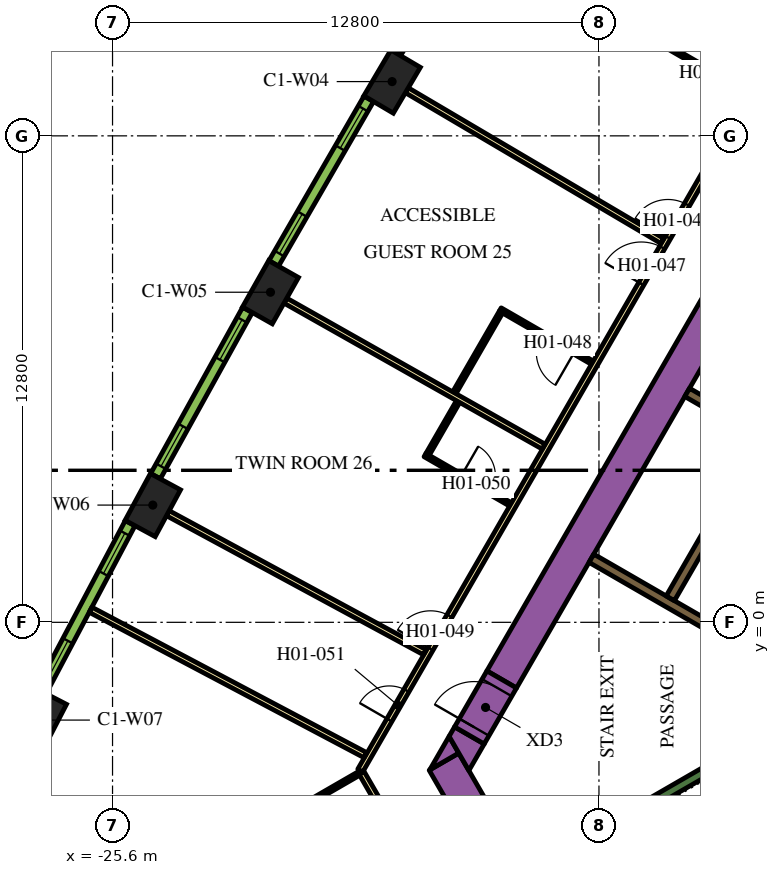
"""IFC4 building model, lengths in metres.
Left out: names, types, materials, properties, quantities, classifications, styles, units other than length and angle.
Written with IfcOpenShell. Run it as: python <this file> out.ifc"""

import sys

from ifc_helpers import new_model, si_unit, direction, frame, frame_2d, origin, origin_2d, place, context, subcontext, project, spatial, polyline, rectangle, outline, extrude, element, fill, save


model = new_model("IFC4")
c1 = context("Model", 3, precision=1e-05, world=origin(), true_north=direction((0.0, 1.0)))
c2 = subcontext(c1, "Body", "Model", "MODEL_VIEW")
j1 = project(units=[si_unit("LENGTHUNIT", "METRE"), si_unit("PLANEANGLEUNIT", "RADIAN")], contexts=[c1])
p1 = place(None, origin())
s1 = spatial("IfcSite", under=j1, at=p1, CompositionType="ELEMENT")
p2 = place(p1, origin())
s2 = spatial("IfcBuilding", under=s1, at=p2, CompositionType="ELEMENT")
p3 = place(p2, frame((0.0, 0.0, 31.5)))
s3 = spatial("IfcBuildingStorey", under=s2, at=p3, CompositionType="ELEMENT", Elevation=31.5)
for number, where, z_axis, x_axis in (
    (1, (-18.243, 14.228, 0.0), (0.0, 0.0, 1.0), (-0.508, -0.861, 0.0)),
    (2, (-21.443, 8.685, 0.0), (0.0, 0.0, 1.0), (-0.492, -0.871, 0.0)),
    (3, (-24.54, 3.085, 0.0), (0.0, 0.0, 1.0), (-0.476, -0.88, 0.0)),
    (4, (-27.533, -2.572, 0.0), (0.0, 0.0, 1.0), (-0.459, -0.888, 0.0)),
):
    element("IfcColumn", number, at=place(p3, frame(where, z_axis=z_axis, x_axis=x_axis)), inside=s3, PredefinedType="COLUMN", context=c2, shape_type="SweptSolid", body=[
        extrude(rectangle(XDim=1.4, YDim=0.9, at=origin_2d()), origin(), (0.0, 0.0, 1.0), 3.9),
    ])
p4 = place(p3, frame((-15.36, -1.503, 0.0), z_axis=(0.0, 0.0, 1.0), x_axis=(0.50000389221, 0.866023156604, 0.0)))
e5 = element("IfcWall", 5, at=p4, inside=s3, PredefinedType="SOLIDWALL", context=c2, shape_type="SweptSolid", body=[
    extrude(rectangle(XDim=21.0, YDim=0.9, at=frame_2d((10.5, 0.0))), origin(), (0.0, 0.0, 1.0), 3.9),
])
p5 = place(p3, frame((-12.134, -11.883, 0.0), z_axis=(0.0, 0.0, 1.0), x_axis=(-0.500005339912, 0.866022320763, 0.0)))
e6 = element("IfcWall", 6, at=p5, inside=s3, PredefinedType="SOLIDWALL", context=c2, shape_type="SweptSolid", body=[
    extrude(rectangle(XDim=9.488, YDim=0.9, at=frame_2d((4.744, 0.0))), origin(), (0.0, 0.0, 1.0), 3.9),
])
p6 = place(p3, origin())
e7 = element("IfcWall", 7, at=p6, inside=s3, PredefinedType="SOLIDWALL", context=c2, shape_type="SweptSolid", body=[
    extrude(outline(polyline([(-16.489, -3.44), (-17.251, -3.88), (-16.743, -3.0), (-16.489, -3.44)])), origin(), (0.0, 0.0, 1.0), 3.9),
])
e8 = element("IfcWall", 8, at=p6, inside=s3, PredefinedType="SOLIDWALL", context=c2, shape_type="SweptSolid", body=[
    extrude(outline(polyline([(-15.82, -3.201), (-16.223, -3.9), (-16.743, -3.0), (-16.599, -2.751), (-15.82, -3.201)])), origin(), (0.0, 0.0, 1.0), 3.9),
])
p7 = place(p3, frame((-14.44, -6.49, 0.0), z_axis=(0.0, 0.0, 1.0), x_axis=(0.866022966069, 0.500004222222, 0.0)))
e9 = element("IfcWall", 9, at=p7, inside=s3, PredefinedType="SOLIDWALL", context=c2, shape_type="SweptSolid", body=[
    extrude(rectangle(XDim=6.8, YDim=0.25, at=frame_2d((3.4, 0.0))), origin(), (0.0, 0.0, 1.0), 3.9),
])
p8 = place(p3, frame((-8.106, -1.14, 0.0), z_axis=(0.0, 0.0, 1.0), x_axis=(-0.866000643155, 0.500042884217, 0.0)))
e10 = element("IfcWall", 10, at=p8, inside=s3, PredefinedType="SOLIDWALL", context=c2, shape_type="SweptSolid", body=[
    extrude(rectangle(XDim=5.65, YDim=0.25, at=frame_2d((2.825, 0.0))), origin(), (0.0, 0.0, 1.0), 3.9),
])
p9 = place(p3, frame((-8.574, 4.95, 0.0), z_axis=(0.0, 0.0, 1.0), x_axis=(-0.866008176907, 0.50002983664, 0.0)))
e11 = element("IfcWall", 11, at=p9, inside=s3, PredefinedType="SOLIDWALL", context=c2, shape_type="SweptSolid", body=[
    extrude(rectangle(XDim=2.2, YDim=0.25, at=frame_2d((1.1, 0.0))), origin(), (0.0, 0.0, 1.0), 3.9),
])
p10 = place(p3, frame((-6.008, 9.144, 0.0), z_axis=(0.0, 0.0, 1.0), x_axis=(-0.500006956611, -0.866021387346, 0.0)))
e12 = element("IfcWall", 12, at=p10, inside=s3, PredefinedType="SOLIDWALL", context=c2, shape_type="SweptSolid", body=[
    extrude(rectangle(XDim=9.83, YDim=0.25, at=frame_2d((4.915, 0.0))), origin(), (0.0, 0.0, 1.0), 3.9),
])
p11 = place(p10, frame((6.985, 0.0, 0.0)))
e13 = element("IfcOpeningElement", 13, at=p11, cuts=e12, PredefinedType="OPENING", context=c2, shape_type="SweptSolid", body=[
    extrude(rectangle(XDim=0.9, YDim=2.1, at=frame_2d((0.45, 1.05))), frame((0.0, 0.135, 0.0), z_axis=(0.0, -1.0, 0.0), x_axis=(1.0, 0.0, 0.0)), (0.0, 0.0, 1.0), 0.27),
])
p12 = place(p3, frame((-16.209, -2.976, 0.0), z_axis=(0.0, 0.0, 1.0), x_axis=(0.499954529098, 0.86605165483, 0.0)))
e14 = element("IfcWall", 14, at=p12, inside=s3, PredefinedType="SOLIDWALL", context=c2, shape_type="SweptSolid", body=[
    extrude(rectangle(XDim=1.7, YDim=0.9, at=frame_2d((0.85, 0.0))), origin(), (0.0, 0.0, 1.0), 3.9),
])
p13 = place(p12, frame((0.25, 0.0, 0.0)))
e15 = element("IfcOpeningElement", 15, at=p13, cuts=e14, PredefinedType="OPENING", context=c2, shape_type="SweptSolid", body=[
    extrude(rectangle(XDim=1.2, YDim=2.1, at=frame_2d((0.6, 1.05))), frame((0.0, 0.46, 0.0), z_axis=(0.0, -1.0, 0.0), x_axis=(1.0, 0.0, 0.0)), (0.0, 0.0, 1.0), 0.92),
])
p14 = place(p3, frame((-19.081, -3.9, 0.0), z_axis=(0.0, 0.0, 1.0), x_axis=(0.499998313975, 0.866026377209, 0.0)))
e16 = element("IfcWall", 16, at=p14, inside=s3, PredefinedType="PARTITIONING", context=c2, shape_type="SweptSolid", body=[
    extrude(rectangle(XDim=25.766, YDim=0.15, at=frame_2d((12.883, 0.0))), origin(), (0.0, 0.0, 1.0), 2.75),
])
p15 = place(p14, frame((24.586, 0.0, 0.0)))
e17 = element("IfcOpeningElement", 17, at=p15, cuts=e16, PredefinedType="OPENING", context=c2, shape_type="SweptSolid", body=[
    extrude(rectangle(XDim=1.0, YDim=2.1, at=frame_2d((0.5, 1.05))), frame((0.0, 0.085, 0.0), z_axis=(0.0, -1.0, 0.0), x_axis=(1.0, 0.0, 0.0)), (0.0, 0.0, 1.0), 0.17),
])
p16 = place(p14, frame((16.196, 0.0, 0.0)))
e18 = element("IfcOpeningElement", 18, at=p16, cuts=e16, PredefinedType="OPENING", context=c2, shape_type="SweptSolid", body=[
    extrude(rectangle(XDim=1.0, YDim=2.1, at=frame_2d((0.5, 1.05))), frame((0.0, 0.085, 0.0), z_axis=(0.0, -1.0, 0.0), x_axis=(1.0, 0.0, 0.0)), (0.0, 0.0, 1.0), 0.17),
])
p17 = place(p14, frame((14.789, 0.0, 0.0)))
e19 = element("IfcOpeningElement", 19, at=p17, cuts=e16, PredefinedType="OPENING", context=c2, shape_type="SweptSolid", body=[
    extrude(rectangle(XDim=1.1, YDim=2.1, at=frame_2d((0.55, 1.05))), frame((0.0, 0.085, 0.0), z_axis=(0.0, -1.0, 0.0), x_axis=(1.0, 0.0, 0.0)), (0.0, 0.0, 1.0), 0.17),
])
p18 = place(p14, frame((3.698, 0.0, 0.0)))
e20 = element("IfcOpeningElement", 20, at=p18, cuts=e16, PredefinedType="OPENING", context=c2, shape_type="SweptSolid", body=[
    extrude(rectangle(XDim=1.0, YDim=2.1, at=frame_2d((0.5, 1.05))), frame((0.0, 0.085, 0.0), z_axis=(0.0, -1.0, 0.0), x_axis=(1.0, 0.0, 0.0)), (0.0, 0.0, 1.0), 0.17),
])
p19 = place(p14, frame((1.531, 0.0, 0.0)))
e21 = element("IfcOpeningElement", 21, at=p19, cuts=e16, PredefinedType="OPENING", context=c2, shape_type="SweptSolid", body=[
    extrude(rectangle(XDim=0.9, YDim=2.1, at=frame_2d((0.45, 1.05))), frame((0.0, 0.085, 0.0), z_axis=(0.0, -1.0, 0.0), x_axis=(1.0, 0.0, 0.0)), (0.0, 0.0, 1.0), 0.17),
])
p20 = place(p3, frame((-16.412, -8.523, 0.0), z_axis=(0.0, 0.0, 1.0), x_axis=(-0.500001929737, 0.866024289647, 0.0)))
e22 = element("IfcWall", 22, at=p20, inside=s3, PredefinedType="PARTITIONING", context=c2, shape_type="SweptSolid", body=[
    extrude(rectangle(XDim=5.268, YDim=0.15, at=frame_2d((2.634, 0.0))), origin(), (0.0, 0.0, 1.0), 2.75),
])
p21 = place(p20, frame((0.226, 0.0, 0.0)))
e23 = element("IfcOpeningElement", 23, at=p21, cuts=e22, PredefinedType="OPENING", context=c2, shape_type="SweptSolid", body=[
    extrude(rectangle(XDim=1.0, YDim=2.1, at=frame_2d((0.5, 1.05))), frame((0.0, 0.085, 0.0), z_axis=(0.0, -1.0, 0.0), x_axis=(1.0, 0.0, 0.0)), (0.0, 0.0, 1.0), 0.17),
])
p22 = place(p3, frame((-26.178, 0.331, 0.0), z_axis=(0.0, 0.0, 1.0), x_axis=(0.883908370409, -0.467660125221, 0.0)))
e24 = element("IfcWall", 24, at=p22, inside=s3, PredefinedType="PARTITIONING", context=c2, shape_type="SweptSolid", body=[
    extrude(rectangle(XDim=8.182, YDim=0.15, at=frame_2d((4.091, 0.0))), origin(), (0.0, 0.0, 1.0), 2.75),
])
p23 = place(p3, frame((-24.145, 2.871, 0.0), z_axis=(0.0, 0.0, 1.0), x_axis=(0.879551725039, -0.475803281809, 0.0)))
e25 = element("IfcWall", 25, at=p23, inside=s3, PredefinedType="PARTITIONING", context=c2, shape_type="SweptSolid", body=[
    extrude(rectangle(XDim=7.688, YDim=0.15, at=frame_2d((3.844, 0.0))), origin(), (0.0, 0.0, 1.0), 2.75),
])
p24 = place(p3, frame((-21.052, 8.464, 0.0), z_axis=(0.0, 0.0, 1.0), x_axis=(0.87059371954, -0.492002617368, 0.0)))
e26 = element("IfcWall", 26, at=p24, inside=s3, PredefinedType="PARTITIONING", context=c2, shape_type="SweptSolid", body=[
    extrude(rectangle(XDim=7.803, YDim=0.15, at=frame_2d((3.902, 0.0))), origin(), (0.0, 0.0, 1.0), 2.75),
])
p25 = place(p3, frame((-17.856, 13.999, 0.0), z_axis=(0.0, 0.0, 1.0), x_axis=(0.861371519381, -0.507975497047, 0.0)))
e27 = element("IfcWall", 27, at=p25, inside=s3, PredefinedType="PARTITIONING", context=c2, shape_type="SweptSolid", body=[
    extrude(rectangle(XDim=7.804, YDim=0.15, at=frame_2d((3.902, 0.0))), origin(), (0.0, 0.0, 1.0), 2.75),
])
p26 = place(p3, frame((-11.129, 15.224, 0.0), z_axis=(0.0, 0.0, 1.0), x_axis=(0.866021400173, -0.500006934395, 0.0)))
e28 = element("IfcWall", 28, at=p26, inside=s3, PredefinedType="PARTITIONING", context=c2, shape_type="SweptSolid", body=[
    extrude(rectangle(XDim=2.6, YDim=0.1, at=frame_2d((1.3, 0.0))), origin(), (0.0, 0.0, 1.0), 2.75),
])
p27 = place(p26, frame((1.1, 0.0, 0.0)))
e29 = element("IfcOpeningElement", 29, at=p27, cuts=e28, PredefinedType="OPENING", context=c2, shape_type="SweptSolid", body=[
    extrude(rectangle(XDim=0.9, YDim=2.1, at=frame_2d((0.45, 1.05))), frame((0.0, 0.06, 0.0), z_axis=(0.0, -1.0, 0.0), x_axis=(1.0, 0.0, 0.0)), (0.0, 0.0, 1.0), 0.12),
])
p28 = place(p3, frame((-12.972, 6.831, 0.0), z_axis=(0.0, 0.0, 1.0), x_axis=(-0.866018616679, 0.500011755427, 0.0)))
e30 = element("IfcWall", 30, at=p28, inside=s3, PredefinedType="PARTITIONING", context=c2, shape_type="SweptSolid", body=[
    extrude(rectangle(XDim=2.8, YDim=0.1, at=frame_2d((1.4, 0.0))), origin(), (0.0, 0.0, 1.0), 2.75),
])
p29 = place(p28, frame((0.55, 0.0, 0.0)))
e31 = element("IfcOpeningElement", 31, at=p29, cuts=e30, PredefinedType="OPENING", context=c2, shape_type="SweptSolid", body=[
    extrude(rectangle(XDim=1.0, YDim=2.1, at=frame_2d((0.5, 1.05))), frame((0.0, 0.06, 0.0), z_axis=(0.0, -1.0, 0.0), x_axis=(1.0, 0.0, 0.0)), (0.0, 0.0, 1.0), 0.12),
])
p30 = place(p3, frame((-15.379, 8.163, 0.0), z_axis=(0.0, 0.0, 1.0), x_axis=(-0.499987006516, -0.866032905446, 0.0)))
e32 = element("IfcWall", 32, at=p30, inside=s3, PredefinedType="PARTITIONING", context=c2, shape_type="SweptSolid", body=[
    extrude(rectangle(XDim=2.45, YDim=0.1, at=frame_2d((1.225, 0.0))), origin(), (0.0, 0.0, 1.0), 2.75),
])
p31 = place(p3, frame((-17.378, 4.401, 0.0), z_axis=(0.0, 0.0, 1.0), x_axis=(0.865997922154, -0.500047596559, 0.0)))
e33 = element("IfcWall", 33, at=p31, inside=s3, PredefinedType="PARTITIONING", context=c2, shape_type="SweptSolid", body=[
    extrude(rectangle(XDim=2.6, YDim=0.1, at=frame_2d((1.3, 0.0))), origin(), (0.0, 0.0, 1.0), 2.75),
])
p32 = place(p31, frame((1.1, 0.0, 0.0)))
e34 = element("IfcOpeningElement", 34, at=p32, cuts=e33, PredefinedType="OPENING", context=c2, shape_type="SweptSolid", body=[
    extrude(rectangle(XDim=0.9, YDim=2.1, at=frame_2d((0.45, 1.05))), frame((0.0, 0.06, 0.0), z_axis=(0.0, -1.0, 0.0), x_axis=(1.0, 0.0, 0.0)), (0.0, 0.0, 1.0), 0.12),
])
p33 = place(p3, frame((-17.309, 4.419, 0.0), z_axis=(0.0, 0.0, 1.0), x_axis=(0.499880961361, 0.866094119867, 0.0)))
e35 = element("IfcWall", 35, at=p33, inside=s3, PredefinedType="PARTITIONING", context=c2, shape_type="SweptSolid", body=[
    extrude(rectangle(XDim=1.6, YDim=0.1, at=frame_2d((0.8, 0.0))), origin(), (0.0, 0.0, 1.0), 2.75),
])
p34 = place(p3, frame((-19.121, -3.981, 0.0), z_axis=(0.0, 0.0, 1.0), x_axis=(-0.866021400173, -0.500006934395, 0.0)))
e36 = element("IfcWall", 36, at=p34, inside=s3, PredefinedType="PARTITIONING", context=c2, shape_type="SweptSolid", body=[
    extrude(rectangle(XDim=2.6, YDim=0.1, at=frame_2d((1.3, 0.0))), origin(), (0.0, 0.0, 1.0), 2.75),
])
p35 = place(p3, frame((-15.564, 19.267, 0.0), z_axis=(0.0, 0.0, 1.0), x_axis=(-0.515938796285, -0.856625448191, 0.0)))
e37 = element("IfcWall", 37, at=p35, inside=s3, PredefinedType="SOLIDWALL", context=c2, shape_type="SweptSolid", body=[
    extrude(rectangle(XDim=4.998, YDim=0.29, at=frame_2d((2.499, 0.0))), origin(), (0.0, 0.0, 1.0), 3.65),
])
p36 = place(p35, frame((0.297, 0.0, 0.9)))
e38 = element("IfcOpeningElement", 38, at=p36, cuts=e37, PredefinedType="OPENING", context=c2, shape_type="SweptSolid", body=[
    extrude(rectangle(XDim=1.2, YDim=2.15, at=frame_2d((0.6, 1.075))), frame((0.0, 0.155, 0.0), z_axis=(0.0, -1.0, 0.0), x_axis=(1.0, 0.0, 0.0)), (0.0, 0.0, 1.0), 0.31),
])
p37 = place(p35, frame((3.501, 0.0, 0.9)))
e39 = element("IfcOpeningElement", 39, at=p37, cuts=e37, PredefinedType="OPENING", context=c2, shape_type="SweptSolid", body=[
    extrude(rectangle(XDim=1.2, YDim=2.15, at=frame_2d((0.6, 1.075))), frame((0.0, 0.155, 0.0), z_axis=(0.0, -1.0, 0.0), x_axis=(1.0, 0.0, 0.0)), (0.0, 0.0, 1.0), 0.31),
])
p38 = place(p3, frame((-18.858, 13.773, 0.0), z_axis=(0.0, 0.0, 1.0), x_axis=(-0.50002123722, -0.866013142123, 0.0)))
e40 = element("IfcWall", 40, at=p38, inside=s3, PredefinedType="SOLIDWALL", context=c2, shape_type="SweptSolid", body=[
    extrude(rectangle(XDim=4.998, YDim=0.29, at=frame_2d((2.499, 0.0))), origin(), (0.0, 0.0, 1.0), 3.65),
])
p39 = place(p38, frame((0.297, 0.0, 0.9)))
e41 = element("IfcOpeningElement", 41, at=p39, cuts=e40, PredefinedType="OPENING", context=c2, shape_type="SweptSolid", body=[
    extrude(rectangle(XDim=1.2, YDim=2.15, at=frame_2d((0.6, 1.075))), frame((0.0, 0.155, 0.0), z_axis=(0.0, -1.0, 0.0), x_axis=(1.0, 0.0, 0.0)), (0.0, 0.0, 1.0), 0.31),
])
p40 = place(p38, frame((3.501, 0.0, 0.9)))
e42 = element("IfcOpeningElement", 42, at=p40, cuts=e40, PredefinedType="OPENING", context=c2, shape_type="SweptSolid", body=[
    extrude(rectangle(XDim=1.2, YDim=2.15, at=frame_2d((0.6, 1.075))), frame((0.0, 0.155, 0.0), z_axis=(0.0, -1.0, 0.0), x_axis=(1.0, 0.0, 0.0)), (0.0, 0.0, 1.0), 0.31),
])
p41 = place(p3, frame((-22.05, 8.22, 0.0), z_axis=(0.0, 0.0, 1.0), x_axis=(-0.483912572871, -0.875116347589, 0.0)))
e43 = element("IfcWall", 43, at=p41, inside=s3, PredefinedType="SOLIDWALL", context=c2, shape_type="SweptSolid", body=[
    extrude(rectangle(XDim=4.998, YDim=0.29, at=frame_2d((2.499, 0.0))), origin(), (0.0, 0.0, 1.0), 3.65),
])
p42 = place(p41, frame((0.297, 0.0, 0.9)))
e44 = element("IfcOpeningElement", 44, at=p42, cuts=e43, PredefinedType="OPENING", context=c2, shape_type="SweptSolid", body=[
    extrude(rectangle(XDim=1.2, YDim=2.15, at=frame_2d((0.6, 1.075))), frame((0.0, 0.155, 0.0), z_axis=(0.0, -1.0, 0.0), x_axis=(1.0, 0.0, 0.0)), (0.0, 0.0, 1.0), 0.31),
])
p43 = place(p41, frame((3.501, 0.0, 0.9)))
e45 = element("IfcOpeningElement", 45, at=p43, cuts=e43, PredefinedType="OPENING", context=c2, shape_type="SweptSolid", body=[
    extrude(rectangle(XDim=1.2, YDim=2.15, at=frame_2d((0.6, 1.075))), frame((0.0, 0.155, 0.0), z_axis=(0.0, -1.0, 0.0), x_axis=(1.0, 0.0, 0.0)), (0.0, 0.0, 1.0), 0.31),
])
p44 = place(p3, frame((-25.138, 2.608, 0.0), z_axis=(0.0, 0.0, 1.0), x_axis=(-0.467629620899, -0.883924509026, 0.0)))
e46 = element("IfcWall", 46, at=p44, inside=s3, PredefinedType="SOLIDWALL", context=c2, shape_type="SweptSolid", body=[
    extrude(rectangle(XDim=4.998, YDim=0.29, at=frame_2d((2.499, 0.0))), origin(), (0.0, 0.0, 1.0), 3.65),
])
p45 = place(p44, frame((0.297, 0.0, 0.9)))
e47 = element("IfcOpeningElement", 47, at=p45, cuts=e46, PredefinedType="OPENING", context=c2, shape_type="SweptSolid", body=[
    extrude(rectangle(XDim=1.2, YDim=2.15, at=frame_2d((0.6, 1.075))), frame((0.0, 0.155, 0.0), z_axis=(0.0, -1.0, 0.0), x_axis=(1.0, 0.0, 0.0)), (0.0, 0.0, 1.0), 0.31),
])
p46 = place(p44, frame((3.501, 0.0, 0.9)))
e48 = element("IfcOpeningElement", 48, at=p46, cuts=e46, PredefinedType="OPENING", context=c2, shape_type="SweptSolid", body=[
    extrude(rectangle(XDim=1.2, YDim=2.15, at=frame_2d((0.6, 1.075))), frame((0.0, 0.155, 0.0), z_axis=(0.0, -1.0, 0.0), x_axis=(1.0, 0.0, 0.0)), (0.0, 0.0, 1.0), 0.31),
])
p47 = place(p13, origin())
e49 = element("IfcDoor", 49, at=p47, inside=s3, OperationType="SINGLE_SWING_LEFT", PredefinedType="DOOR", context=c2, shape_type="SweptSolid", body=[
    extrude(rectangle(XDim=1.2, YDim=2.1, at=frame_2d((0.6, 1.05))), frame((0.0, 0.025, 0.0), z_axis=(0.0, -1.0, 0.0), x_axis=(1.0, 0.0, 0.0)), (0.0, 0.0, 1.0), 0.05),
])
fill(e15, e49)
p48 = place(p16, origin())
e50 = element("IfcDoor", 50, at=p48, inside=s3, OperationType="SINGLE_SWING_LEFT", PredefinedType="DOOR", context=c2, shape_type="SweptSolid", body=[
    extrude(rectangle(XDim=1.0, YDim=2.1, at=frame_2d((0.5, 1.05))), frame((0.0, 0.025, 0.0), z_axis=(0.0, -1.0, 0.0), x_axis=(1.0, 0.0, 0.0)), (0.0, 0.0, 1.0), 0.05),
])
fill(e18, e50)
p49 = place(p27, origin())
e51 = element("IfcDoor", 51, at=p49, inside=s3, OperationType="SINGLE_SWING_RIGHT", PredefinedType="DOOR", context=c2, shape_type="SweptSolid", body=[
    extrude(rectangle(XDim=0.9, YDim=2.1, at=frame_2d((0.45, 1.05))), frame((0.0, 0.025, 0.0), z_axis=(0.0, -1.0, 0.0), x_axis=(1.0, 0.0, 0.0)), (0.0, 0.0, 1.0), 0.05),
])
fill(e29, e51)
p50 = place(p17, origin())
e52 = element("IfcDoor", 52, at=p50, inside=s3, OperationType="SINGLE_SWING_RIGHT", PredefinedType="DOOR", context=c2, shape_type="SweptSolid", body=[
    extrude(rectangle(XDim=1.1, YDim=2.1, at=frame_2d((0.55, 1.05))), frame((0.0, 0.025, 0.0), z_axis=(0.0, -1.0, 0.0), x_axis=(1.0, 0.0, 0.0)), (0.0, 0.0, 1.0), 0.05),
])
fill(e19, e52)
p51 = place(p29, origin())
e53 = element("IfcDoor", 53, at=p51, inside=s3, OperationType="SINGLE_SWING_LEFT", PredefinedType="DOOR", context=c2, shape_type="SweptSolid", body=[
    extrude(rectangle(XDim=1.0, YDim=2.1, at=frame_2d((0.5, 1.05))), frame((0.0, 0.025, 0.0), z_axis=(0.0, -1.0, 0.0), x_axis=(1.0, 0.0, 0.0)), (0.0, 0.0, 1.0), 0.05),
])
fill(e31, e53)
p52 = place(p18, origin())
e54 = element("IfcDoor", 54, at=p52, inside=s3, OperationType="SINGLE_SWING_LEFT", PredefinedType="DOOR", context=c2, shape_type="SweptSolid", body=[
    extrude(rectangle(XDim=1.0, YDim=2.1, at=frame_2d((0.5, 1.05))), frame((0.0, 0.025, 0.0), z_axis=(0.0, -1.0, 0.0), x_axis=(1.0, 0.0, 0.0)), (0.0, 0.0, 1.0), 0.05),
])
fill(e20, e54)
p53 = place(p32, origin())
e55 = element("IfcDoor", 55, at=p53, inside=s3, OperationType="SINGLE_SWING_LEFT", PredefinedType="DOOR", context=c2, shape_type="SweptSolid", body=[
    extrude(rectangle(XDim=0.9, YDim=2.1, at=frame_2d((0.45, 1.05))), frame((0.0, 0.025, 0.0), z_axis=(0.0, -1.0, 0.0), x_axis=(1.0, 0.0, 0.0)), (0.0, 0.0, 1.0), 0.05),
])
fill(e34, e55)
p54 = place(p19, origin())
e56 = element("IfcDoor", 56, at=p54, inside=s3, OperationType="SINGLE_SWING_LEFT", PredefinedType="DOOR", context=c2, shape_type="SweptSolid", body=[
    extrude(rectangle(XDim=0.9, YDim=2.1, at=frame_2d((0.45, 1.05))), frame((0.0, 0.025, 0.0), z_axis=(0.0, -1.0, 0.0), x_axis=(1.0, 0.0, 0.0)), (0.0, 0.0, 1.0), 0.05),
])
fill(e21, e56)
p55 = place(p39, origin())
e57 = element("IfcWindow", 57, at=p55, inside=s3, PartitioningType="DOUBLE_PANEL_VERTICAL", PredefinedType="WINDOW", context=c2, shape_type="SweptSolid", body=[
    extrude(rectangle(XDim=1.2, YDim=2.15, at=frame_2d((0.6, 1.075))), frame((0.0, 0.015, 0.0), z_axis=(0.0, -1.0, 0.0), x_axis=(1.0, 0.0, 0.0)), (0.0, 0.0, 1.0), 0.06),
])
fill(e41, e57)
p56 = place(p40, origin())
e58 = element("IfcWindow", 58, at=p56, inside=s3, PartitioningType="DOUBLE_PANEL_VERTICAL", PredefinedType="WINDOW", context=c2, shape_type="SweptSolid", body=[
    extrude(rectangle(XDim=1.2, YDim=2.15, at=frame_2d((0.6, 1.075))), frame((0.0, 0.015, 0.0), z_axis=(0.0, -1.0, 0.0), x_axis=(1.0, 0.0, 0.0)), (0.0, 0.0, 1.0), 0.06),
])
fill(e42, e58)
p57 = place(p42, origin())
e59 = element("IfcWindow", 59, at=p57, inside=s3, PartitioningType="DOUBLE_PANEL_VERTICAL", PredefinedType="WINDOW", context=c2, shape_type="SweptSolid", body=[
    extrude(rectangle(XDim=1.2, YDim=2.15, at=frame_2d((0.6, 1.075))), frame((0.0, 0.015, 0.0), z_axis=(0.0, -1.0, 0.0), x_axis=(1.0, 0.0, 0.0)), (0.0, 0.0, 1.0), 0.06),
])
fill(e44, e59)
p58 = place(p43, origin())
e60 = element("IfcWindow", 60, at=p58, inside=s3, PartitioningType="DOUBLE_PANEL_VERTICAL", PredefinedType="WINDOW", context=c2, shape_type="SweptSolid", body=[
    extrude(rectangle(XDim=1.2, YDim=2.15, at=frame_2d((0.6, 1.075))), frame((0.0, 0.015, 0.0), z_axis=(0.0, -1.0, 0.0), x_axis=(1.0, 0.0, 0.0)), (0.0, 0.0, 1.0), 0.06),
])
fill(e45, e60)
p59 = place(p45, origin())
e61 = element("IfcWindow", 61, at=p59, inside=s3, PartitioningType="DOUBLE_PANEL_VERTICAL", PredefinedType="WINDOW", context=c2, shape_type="SweptSolid", body=[
    extrude(rectangle(XDim=1.2, YDim=2.15, at=frame_2d((0.6, 1.075))), frame((0.0, 0.015, 0.0), z_axis=(0.0, -1.0, 0.0), x_axis=(1.0, 0.0, 0.0)), (0.0, 0.0, 1.0), 0.06),
])
fill(e47, e61)
p60 = place(p46, origin())
e62 = element("IfcWindow", 62, at=p60, inside=s3, PartitioningType="DOUBLE_PANEL_VERTICAL", PredefinedType="WINDOW", context=c2, shape_type="SweptSolid", body=[
    extrude(rectangle(XDim=1.2, YDim=2.15, at=frame_2d((0.6, 1.075))), frame((0.0, 0.015, 0.0), z_axis=(0.0, -1.0, 0.0), x_axis=(1.0, 0.0, 0.0)), (0.0, 0.0, 1.0), 0.06),
])
fill(e48, e62)
save(model, sys.argv[1])
